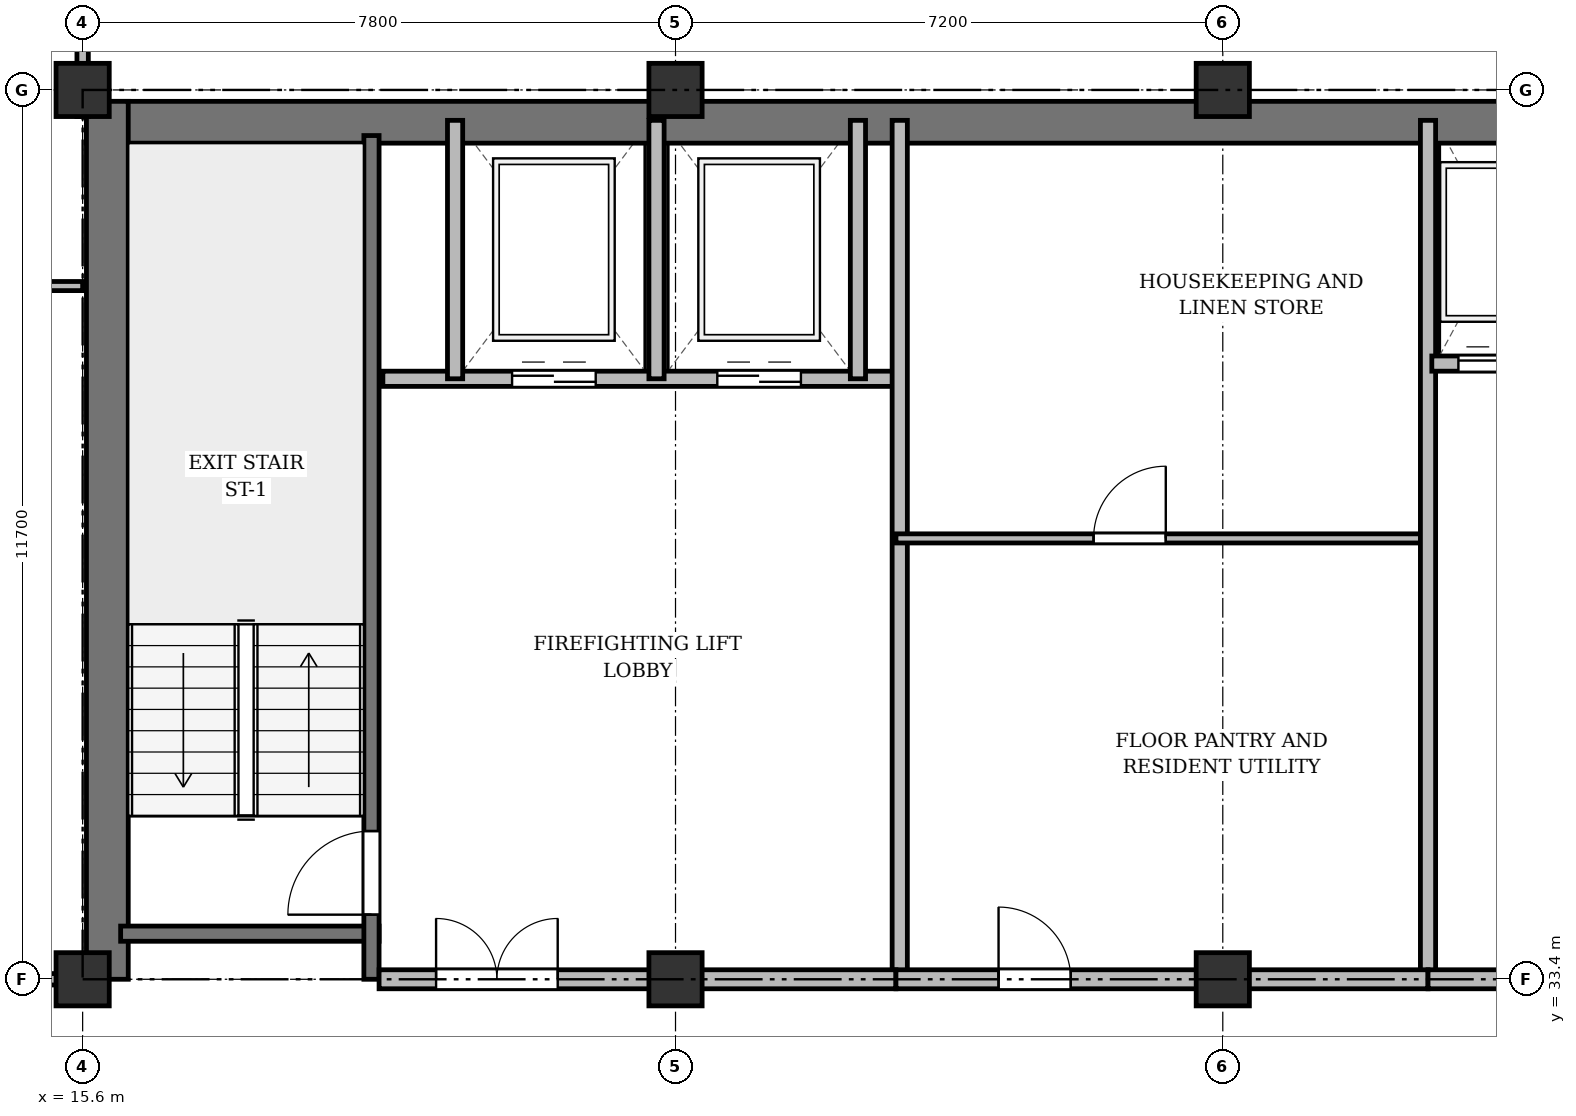
"""IFC4 building model, lengths in metres.
Left out: names, types, materials, properties, quantities, classifications, styles, units other than length and angle.
Written with IfcOpenShell. Run it as: python <this file> out.ifc"""

import sys

from ifc_helpers import new_model, si_unit, direction, frame, frame_2d, origin, origin_2d, place, context, subcontext, project, spatial, rectangle, extrude, source, transform, mapped, element, fill, save


model = new_model("IFC4")
c1 = context("Model", 3, precision=1e-05, world=origin(), true_north=direction((0.0, 1.0)))
c2 = subcontext(c1, "Body", "Model", "MODEL_VIEW")
j1 = project(units=[si_unit("LENGTHUNIT", "METRE"), si_unit("PLANEANGLEUNIT", "RADIAN")], contexts=[c1])
p1 = place(None, origin())
s1 = spatial("IfcSite", under=j1, at=p1, CompositionType="ELEMENT")
p2 = place(p1, origin())
s2 = spatial("IfcBuilding", under=s1, at=p2, CompositionType="ELEMENT")
p3 = place(p2, frame((0.0, 0.0, 208.5)))
s3 = spatial("IfcBuildingStorey", under=s2, at=p3, CompositionType="ELEMENT", Elevation=208.5)
m1 = source(origin(), c2, "Body", "SweptSolid", [
    extrude(rectangle(XDim=0.7, YDim=0.7, at=origin_2d()), origin(), (0.0, 0.0, 1.0), 3.6),
])
for number, where, z_axis, x_axis in (
    (1, (15.6, 33.4, 0.0), (0.0, 0.0, 1.0), (1.0, 0.0, 0.0)),
    (2, (15.6, 45.1, 0.0), (0.0, 0.0, 1.0), (1.0, 0.0, 0.0)),
    (3, (23.4, 33.4, 0.0), (0.0, 0.0, 1.0), (1.0, 0.0, 0.0)),
    (4, (23.4, 45.1, 0.0), (0.0, 0.0, 1.0), (1.0, 0.0, 0.0)),
    (5, (30.6, 33.4, 0.0), (0.0, 0.0, 1.0), (1.0, 0.0, 0.0)),
    (6, (30.6, 45.1, 0.0), (0.0, 0.0, 1.0), (1.0, 0.0, 0.0)),
):
    element("IfcColumn", number, at=place(p3, frame(where, z_axis=z_axis, x_axis=x_axis)), inside=s3, PredefinedType="COLUMN", context=c2, shape_type="MappedRepresentation", body=[
        mapped(m1, transform((0.0, 0.0, 0.0), x_axis=(1.0, 0.0, 0.0), y_axis=(0.0, 1.0, 0.0), z_axis=(0.0, 0.0, 1.0), scale=1.0)),
    ])
p4 = place(p3, frame((15.65, 44.675, 0.0), z_axis=(0.0, 0.0, 1.0), x_axis=(1.0, 0.0, 0.0)))
e7 = element("IfcWall", 7, at=p4, inside=s3, PredefinedType="SHEAR", context=c2, shape_type="SweptSolid", body=[
    extrude(rectangle(XDim=43.1, YDim=0.55, at=frame_2d((21.55, 0.0))), origin(), (0.0, 0.0, 1.0), 3.36),
])
p5 = place(p3, frame((15.925, 33.4, 0.0), z_axis=(0.0, 0.0, 1.0), x_axis=(0.0, 1.0, 0.0)))
e8 = element("IfcWall", 8, at=p5, inside=s3, PredefinedType="SHEAR", context=c2, shape_type="SweptSolid", body=[
    extrude(rectangle(XDim=11.55, YDim=0.55, at=frame_2d((5.775, 0.0))), origin(), (0.0, 0.0, 1.0), 3.36),
])
p6 = place(p3, frame((16.1, 34.0, 0.0), z_axis=(0.0, 0.0, 1.0), x_axis=(1.0, 0.0, 0.0)))
e9 = element("IfcWall", 9, at=p6, inside=s3, PredefinedType="SHEAR", context=c2, shape_type="SweptSolid", body=[
    extrude(rectangle(XDim=3.4, YDim=0.2, at=frame_2d((1.7, 0.0))), origin(), (0.0, 0.0, 1.0), 3.36),
])
p7 = place(p3, frame((19.4, 33.4, 0.0), z_axis=(0.0, 0.0, 1.0), x_axis=(0.0, 1.0, 0.0)))
e10 = element("IfcWall", 10, at=p7, inside=s3, PredefinedType="SHEAR", context=c2, shape_type="SweptSolid", body=[
    extrude(rectangle(XDim=11.1, YDim=0.2, at=frame_2d((5.55, 0.0))), origin(), (0.0, 0.0, 1.0), 3.36),
])
p8 = place(p7, frame((0.85, 0.0, 0.0)))
e11 = element("IfcOpeningElement", 11, at=p8, cuts=e10, PredefinedType="OPENING", context=c2, shape_type="SweptSolid", body=[
    extrude(rectangle(XDim=1.1, YDim=2.15, at=frame_2d((0.55, 1.075))), frame((0.0, 0.11, 0.0), z_axis=(0.0, -1.0, 0.0), x_axis=(1.0, 0.0, 0.0)), (0.0, 0.0, 1.0), 0.22),
])
p9 = place(p3, frame((19.55, 41.3, 0.0), z_axis=(0.0, 0.0, 1.0), x_axis=(1.0, 0.0, 0.0)))
e12 = element("IfcWall", 12, at=p9, inside=s3, PredefinedType="SOLIDWALL", context=c2, shape_type="SweptSolid", body=[
    extrude(rectangle(XDim=6.75, YDim=0.2, at=frame_2d((3.375, 0.0))), origin(), (0.0, 0.0, 1.0), 3.36),
])
p10 = place(p9, frame((1.7, 0.0, 0.0)))
e13 = element("IfcOpeningElement", 13, at=p10, cuts=e12, PredefinedType="OPENING", context=c2, shape_type="SweptSolid", body=[
    extrude(rectangle(XDim=1.1, YDim=2.15, at=frame_2d((0.55, 1.075))), frame((0.0, 0.11, 0.0), z_axis=(0.0, -1.0, 0.0), x_axis=(1.0, 0.0, 0.0)), (0.0, 0.0, 1.0), 0.22),
])
p11 = place(p9, frame((4.4, 0.0, 0.0)))
e14 = element("IfcOpeningElement", 14, at=p11, cuts=e12, PredefinedType="OPENING", context=c2, shape_type="SweptSolid", body=[
    extrude(rectangle(XDim=1.1, YDim=2.15, at=frame_2d((0.55, 1.075))), frame((0.0, 0.11, 0.0), z_axis=(0.0, -1.0, 0.0), x_axis=(1.0, 0.0, 0.0)), (0.0, 0.0, 1.0), 0.22),
])
for number, where, z_axis, x_axis in (
    (15, (20.5, 41.3, 0.0), (0.0, 0.0, 1.0), (0.0, 1.0, 0.0)),
    (16, (23.15, 41.3, 0.0), (0.0, 0.0, 1.0), (0.0, 1.0, 0.0)),
    (17, (25.8, 41.3, 0.0), (0.0, 0.0, 1.0), (0.0, 1.0, 0.0)),
):
    element("IfcWall", number, at=place(p3, frame(where, z_axis=z_axis, x_axis=x_axis)), inside=s3, PredefinedType="SOLIDWALL", context=c2, shape_type="SweptSolid", body=[
        extrude(rectangle(XDim=3.4, YDim=0.2, at=frame_2d((1.7, 0.0))), origin(), (0.0, 0.0, 1.0), 3.36),
    ])
p12 = place(p3, frame((26.35, 33.4, 0.0), z_axis=(0.0, 0.0, 1.0), x_axis=(0.0, 1.0, 0.0)))
e18 = element("IfcWall", 18, at=p12, inside=s3, PredefinedType="SOLIDWALL", context=c2, shape_type="SweptSolid", body=[
    extrude(rectangle(XDim=11.3, YDim=0.2, at=frame_2d((5.65, 0.0))), origin(), (0.0, 0.0, 1.0), 2.91),
])
p13 = place(p3, frame((19.5, 33.4, 0.0), z_axis=(0.0, 0.0, 1.0), x_axis=(1.0, 0.0, 0.0)))
e19 = element("IfcWall", 19, at=p13, inside=s3, PredefinedType="PARTITIONING", context=c2, shape_type="SweptSolid", body=[
    extrude(rectangle(XDim=6.8, YDim=0.25, at=frame_2d((3.4, 0.0))), origin(), (0.0, 0.0, 1.0), 2.91),
])
p14 = place(p13, frame((0.75, 0.0, 0.0)))
e20 = element("IfcOpeningElement", 20, at=p14, cuts=e19, PredefinedType="OPENING", context=c2, shape_type="SweptSolid", body=[
    extrude(rectangle(XDim=1.6, YDim=2.2, at=frame_2d((0.8, 1.1))), frame((0.0, 0.135, 0.0), z_axis=(0.0, -1.0, 0.0), x_axis=(1.0, 0.0, 0.0)), (0.0, 0.0, 1.0), 0.27),
])
p15 = place(p3, frame((26.3, 39.2, 0.0), z_axis=(0.0, 0.0, 1.0), x_axis=(1.0, 0.0, 0.0)))
e21 = element("IfcWall", 21, at=p15, inside=s3, PredefinedType="PARTITIONING", context=c2, shape_type="SweptSolid", body=[
    extrude(rectangle(XDim=7.0, YDim=0.12, at=frame_2d((3.5, 0.0))), origin(), (0.0, 0.0, 1.0), 2.86),
])
p16 = place(p15, frame((2.6, 0.0, 0.0)))
e22 = element("IfcOpeningElement", 22, at=p16, cuts=e21, PredefinedType="OPENING", context=c2, shape_type="SweptSolid", body=[
    extrude(rectangle(XDim=0.95, YDim=2.15, at=frame_2d((0.475, 1.075))), frame((0.0, 0.07, 0.0), z_axis=(0.0, -1.0, 0.0), x_axis=(1.0, 0.0, 0.0)), (0.0, 0.0, 1.0), 0.14),
])
p17 = place(p3, frame((33.3, 33.4, 0.0), z_axis=(0.0, 0.0, 1.0), x_axis=(0.0, 1.0, 0.0)))
e23 = element("IfcWall", 23, at=p17, inside=s3, PredefinedType="SOLIDWALL", context=c2, shape_type="SweptSolid", body=[
    extrude(rectangle(XDim=11.3, YDim=0.2, at=frame_2d((5.65, 0.0))), origin(), (0.0, 0.0, 1.0), 2.91),
])
p18 = place(p3, frame((33.35, 41.5, 0.0), z_axis=(0.0, 0.0, 1.0), x_axis=(1.0, 0.0, 0.0)))
e24 = element("IfcWall", 24, at=p18, inside=s3, PredefinedType="SOLIDWALL", context=c2, shape_type="SweptSolid", body=[
    extrude(rectangle(XDim=6.9, YDim=0.2, at=frame_2d((3.45, 0.0))), origin(), (0.0, 0.0, 1.0), 3.36),
])
p19 = place(p18, frame((0.35, 0.0, 0.0)))
e25 = element("IfcOpeningElement", 25, at=p19, cuts=e24, PredefinedType="OPENING", context=c2, shape_type="SweptSolid", body=[
    extrude(rectangle(XDim=1.05, YDim=2.15, at=frame_2d((0.525, 1.075))), frame((0.0, 0.11, 0.0), z_axis=(0.0, -1.0, 0.0), x_axis=(1.0, 0.0, 0.0)), (0.0, 0.0, 1.0), 0.22),
])
p20 = place(p18, frame((2.05, 0.0, 0.0)))
e26 = element("IfcOpeningElement", 26, at=p20, cuts=e24, PredefinedType="OPENING", context=c2, shape_type="SweptSolid", body=[
    extrude(rectangle(XDim=1.05, YDim=2.15, at=frame_2d((0.525, 1.075))), frame((0.0, 0.11, 0.0), z_axis=(0.0, -1.0, 0.0), x_axis=(1.0, 0.0, 0.0)), (0.0, 0.0, 1.0), 0.22),
])
p21 = place(p18, frame((3.75, 0.0, 0.0)))
e27 = element("IfcOpeningElement", 27, at=p21, cuts=e24, PredefinedType="OPENING", context=c2, shape_type="SweptSolid", body=[
    extrude(rectangle(XDim=1.05, YDim=2.15, at=frame_2d((0.525, 1.075))), frame((0.0, 0.11, 0.0), z_axis=(0.0, -1.0, 0.0), x_axis=(1.0, 0.0, 0.0)), (0.0, 0.0, 1.0), 0.22),
])
p22 = place(p18, frame((5.45, 0.0, 0.0)))
e28 = element("IfcOpeningElement", 28, at=p22, cuts=e24, PredefinedType="OPENING", context=c2, shape_type="SweptSolid", body=[
    extrude(rectangle(XDim=1.05, YDim=2.15, at=frame_2d((0.525, 1.075))), frame((0.0, 0.11, 0.0), z_axis=(0.0, -1.0, 0.0), x_axis=(1.0, 0.0, 0.0)), (0.0, 0.0, 1.0), 0.22),
])
p23 = place(p3, frame((26.3, 33.4, 0.0), z_axis=(0.0, 0.0, 1.0), x_axis=(1.0, 0.0, 0.0)))
e29 = element("IfcWall", 29, at=p23, inside=s3, PredefinedType="PARTITIONING", context=c2, shape_type="SweptSolid", body=[
    extrude(rectangle(XDim=7.0, YDim=0.25, at=frame_2d((3.5, 0.0))), origin(), (0.0, 0.0, 1.0), 2.91),
])
p24 = place(p23, frame((1.35, 0.0, 0.0)))
e30 = element("IfcOpeningElement", 30, at=p24, cuts=e29, PredefinedType="OPENING", context=c2, shape_type="SweptSolid", body=[
    extrude(rectangle(XDim=0.95, YDim=2.15, at=frame_2d((0.475, 1.075))), frame((0.0, 0.135, 0.0), z_axis=(0.0, -1.0, 0.0), x_axis=(1.0, 0.0, 0.0)), (0.0, 0.0, 1.0), 0.27),
])
p25 = place(p3, frame((33.3, 33.4, 0.0), z_axis=(0.0, 0.0, 1.0), x_axis=(1.0, 0.0, 0.0)))
e31 = element("IfcWall", 31, at=p25, inside=s3, PredefinedType="PARTITIONING", context=c2, shape_type="SweptSolid", body=[
    extrude(rectangle(XDim=13.85, YDim=0.25, at=frame_2d((6.925, 0.0))), origin(), (0.0, 0.0, 1.0), 2.91),
])
p26 = place(p25, frame((4.2, 0.0, 0.0)))
e32 = element("IfcOpeningElement", 32, at=p26, cuts=e31, PredefinedType="OPENING", context=c2, shape_type="SweptSolid", body=[
    extrude(rectangle(XDim=1.6, YDim=2.2, at=frame_2d((0.8, 1.1))), frame((0.0, 0.135, 0.0), z_axis=(0.0, -1.0, 0.0), x_axis=(1.0, 0.0, 0.0)), (0.0, 0.0, 1.0), 0.27),
])
p27 = place(p3, frame((11.925, 42.52, 0.0), z_axis=(0.0, 0.0, 1.0), x_axis=(1.0, 0.0, 0.0)))
e33 = element("IfcWall", 33, at=p27, inside=s3, PredefinedType="PARTITIONING", context=c2, shape_type="SweptSolid", body=[
    extrude(rectangle(XDim=3.675, YDim=0.12, at=frame_2d((1.837, 0.0))), origin(), (0.0, 0.0, 1.0), 2.86),
])
p28 = place(p27, frame((1.362, 0.0, 0.0)))
e34 = element("IfcOpeningElement", 34, at=p28, cuts=e33, PredefinedType="OPENING", context=c2, shape_type="SweptSolid", body=[
    extrude(rectangle(XDim=0.95, YDim=2.15, at=frame_2d((0.475, 1.075))), frame((0.0, 0.07, 0.0), z_axis=(0.0, -1.0, 0.0), x_axis=(1.0, 0.0, 0.0)), (0.0, 0.0, 1.0), 0.14),
])
p29 = place(p3, frame((8.25, 33.4, 0.0), z_axis=(0.0, 0.0, 1.0), x_axis=(1.0, 0.0, 0.0)))
e35 = element("IfcWall", 35, at=p29, inside=s3, PredefinedType="PARTITIONING", context=c2, shape_type="SweptSolid", body=[
    extrude(rectangle(XDim=7.35, YDim=0.15, at=frame_2d((3.675, 0.0))), origin(), (0.0, 0.0, 1.0), 2.91),
])
p30 = place(p29, frame((4.275, 0.0, 0.0)))
e36 = element("IfcOpeningElement", 36, at=p30, cuts=e35, PredefinedType="OPENING", context=c2, shape_type="SweptSolid", body=[
    extrude(rectangle(XDim=0.95, YDim=2.15, at=frame_2d((0.475, 1.075))), frame((0.0, 0.085, 0.0), z_axis=(0.0, -1.0, 0.0), x_axis=(1.0, 0.0, 0.0)), (0.0, 0.0, 1.0), 0.17),
])
p31 = place(p3, frame((15.6, 44.75, 0.0), z_axis=(0.0, 0.0, 1.0), x_axis=(0.0, 1.0, 0.0)))
e37 = element("IfcWall", 37, at=p31, inside=s3, PredefinedType="PARTITIONING", context=c2, shape_type="SweptSolid", body=[
    extrude(rectangle(XDim=3.61, YDim=0.15, at=frame_2d((1.805, 0.0))), origin(), (0.0, 0.0, 1.0), 2.86),
])
p32 = place(p31, frame((1.1, 0.0, 0.0)))
e38 = element("IfcOpeningElement", 38, at=p32, cuts=e37, PredefinedType="OPENING", context=c2, shape_type="SweptSolid", body=[
    extrude(rectangle(XDim=0.95, YDim=2.15, at=frame_2d((0.475, 1.075))), frame((0.0, 0.085, 0.0), z_axis=(0.0, -1.0, 0.0), x_axis=(1.0, 0.0, 0.0)), (0.0, 0.0, 1.0), 0.17),
])
m2 = source(origin(), c2, "Body", "SweptSolid", [
    extrude(rectangle(XDim=1.1, YDim=2.15, at=frame_2d((0.55, 1.075))), frame((0.0, 0.025, 0.0), z_axis=(0.0, -1.0, 0.0), x_axis=(1.0, 0.0, 0.0)), (0.0, 0.0, 1.0), 0.05),
])
p33 = place(p8, origin())
e39 = element("IfcDoor", 39, at=p33, inside=s3, OperationType="SINGLE_SWING_LEFT", PredefinedType="DOOR", context=c2, shape_type="MappedRepresentation", body=[
    mapped(m2, transform((0.0, 0.0, 0.0), x_axis=(1.0, 0.0, 0.0), y_axis=(0.0, 1.0, 0.0), z_axis=(0.0, 0.0, 1.0), scale=1.0)),
])
fill(e11, e39)
p34 = place(p10, origin())
e40 = element("IfcDoor", 40, at=p34, inside=s3, OperationType="DOUBLE_DOOR_SLIDING", PredefinedType="DOOR", context=c2, shape_type="MappedRepresentation", body=[
    mapped(m2, transform((0.0, 0.0, 0.0), x_axis=(1.0, 0.0, 0.0), y_axis=(0.0, 1.0, 0.0), z_axis=(0.0, 0.0, 1.0), scale=1.0)),
])
fill(e13, e40)
p35 = place(p11, origin())
e41 = element("IfcDoor", 41, at=p35, inside=s3, OperationType="DOUBLE_DOOR_SLIDING", PredefinedType="DOOR", context=c2, shape_type="MappedRepresentation", body=[
    mapped(m2, transform((0.0, 0.0, 0.0), x_axis=(1.0, 0.0, 0.0), y_axis=(0.0, 1.0, 0.0), z_axis=(0.0, 0.0, 1.0), scale=1.0)),
])
fill(e14, e41)
m3 = source(origin(), c2, "Body", "SweptSolid", [
    extrude(rectangle(XDim=1.6, YDim=2.2, at=frame_2d((0.8, 1.1))), frame((0.0, 0.025, 0.0), z_axis=(0.0, -1.0, 0.0), x_axis=(1.0, 0.0, 0.0)), (0.0, 0.0, 1.0), 0.05),
])
p36 = place(p14, origin())
e42 = element("IfcDoor", 42, at=p36, inside=s3, OperationType="DOUBLE_DOOR_SINGLE_SWING", PredefinedType="DOOR", context=c2, shape_type="MappedRepresentation", body=[
    mapped(m3, transform((0.0, 0.0, 0.0), x_axis=(1.0, 0.0, 0.0), y_axis=(0.0, 1.0, 0.0), z_axis=(0.0, 0.0, 1.0), scale=1.0)),
])
fill(e20, e42)
m4 = source(origin(), c2, "Body", "SweptSolid", [
    extrude(rectangle(XDim=0.95, YDim=2.15, at=frame_2d((0.475, 1.075))), frame((0.0, 0.025, 0.0), z_axis=(0.0, -1.0, 0.0), x_axis=(1.0, 0.0, 0.0)), (0.0, 0.0, 1.0), 0.05),
])
p37 = place(p16, origin())
e43 = element("IfcDoor", 43, at=p37, inside=s3, OperationType="SINGLE_SWING_RIGHT", PredefinedType="DOOR", context=c2, shape_type="MappedRepresentation", body=[
    mapped(m4, transform((0.0, 0.0, 0.0), x_axis=(1.0, 0.0, 0.0), y_axis=(0.0, 1.0, 0.0), z_axis=(0.0, 0.0, 1.0), scale=1.0)),
])
fill(e22, e43)
m5 = source(origin(), c2, "Body", "SweptSolid", [
    extrude(rectangle(XDim=1.05, YDim=2.15, at=frame_2d((0.525, 1.075))), frame((0.0, 0.025, 0.0), z_axis=(0.0, -1.0, 0.0), x_axis=(1.0, 0.0, 0.0)), (0.0, 0.0, 1.0), 0.05),
])
p38 = place(p19, origin())
e44 = element("IfcDoor", 44, at=p38, inside=s3, OperationType="DOUBLE_DOOR_SLIDING", PredefinedType="DOOR", context=c2, shape_type="MappedRepresentation", body=[
    mapped(m5, transform((0.0, 0.0, 0.0), x_axis=(1.0, 0.0, 0.0), y_axis=(0.0, 1.0, 0.0), z_axis=(0.0, 0.0, 1.0), scale=1.0)),
])
fill(e25, e44)
p39 = place(p24, origin())
e45 = element("IfcDoor", 45, at=p39, inside=s3, OperationType="SINGLE_SWING_LEFT", PredefinedType="DOOR", context=c2, shape_type="MappedRepresentation", body=[
    mapped(m4, transform((0.0, 0.0, 0.0), x_axis=(1.0, 0.0, 0.0), y_axis=(0.0, 1.0, 0.0), z_axis=(0.0, 0.0, 1.0), scale=1.0)),
])
fill(e30, e45)
save(model, sys.argv[1])
